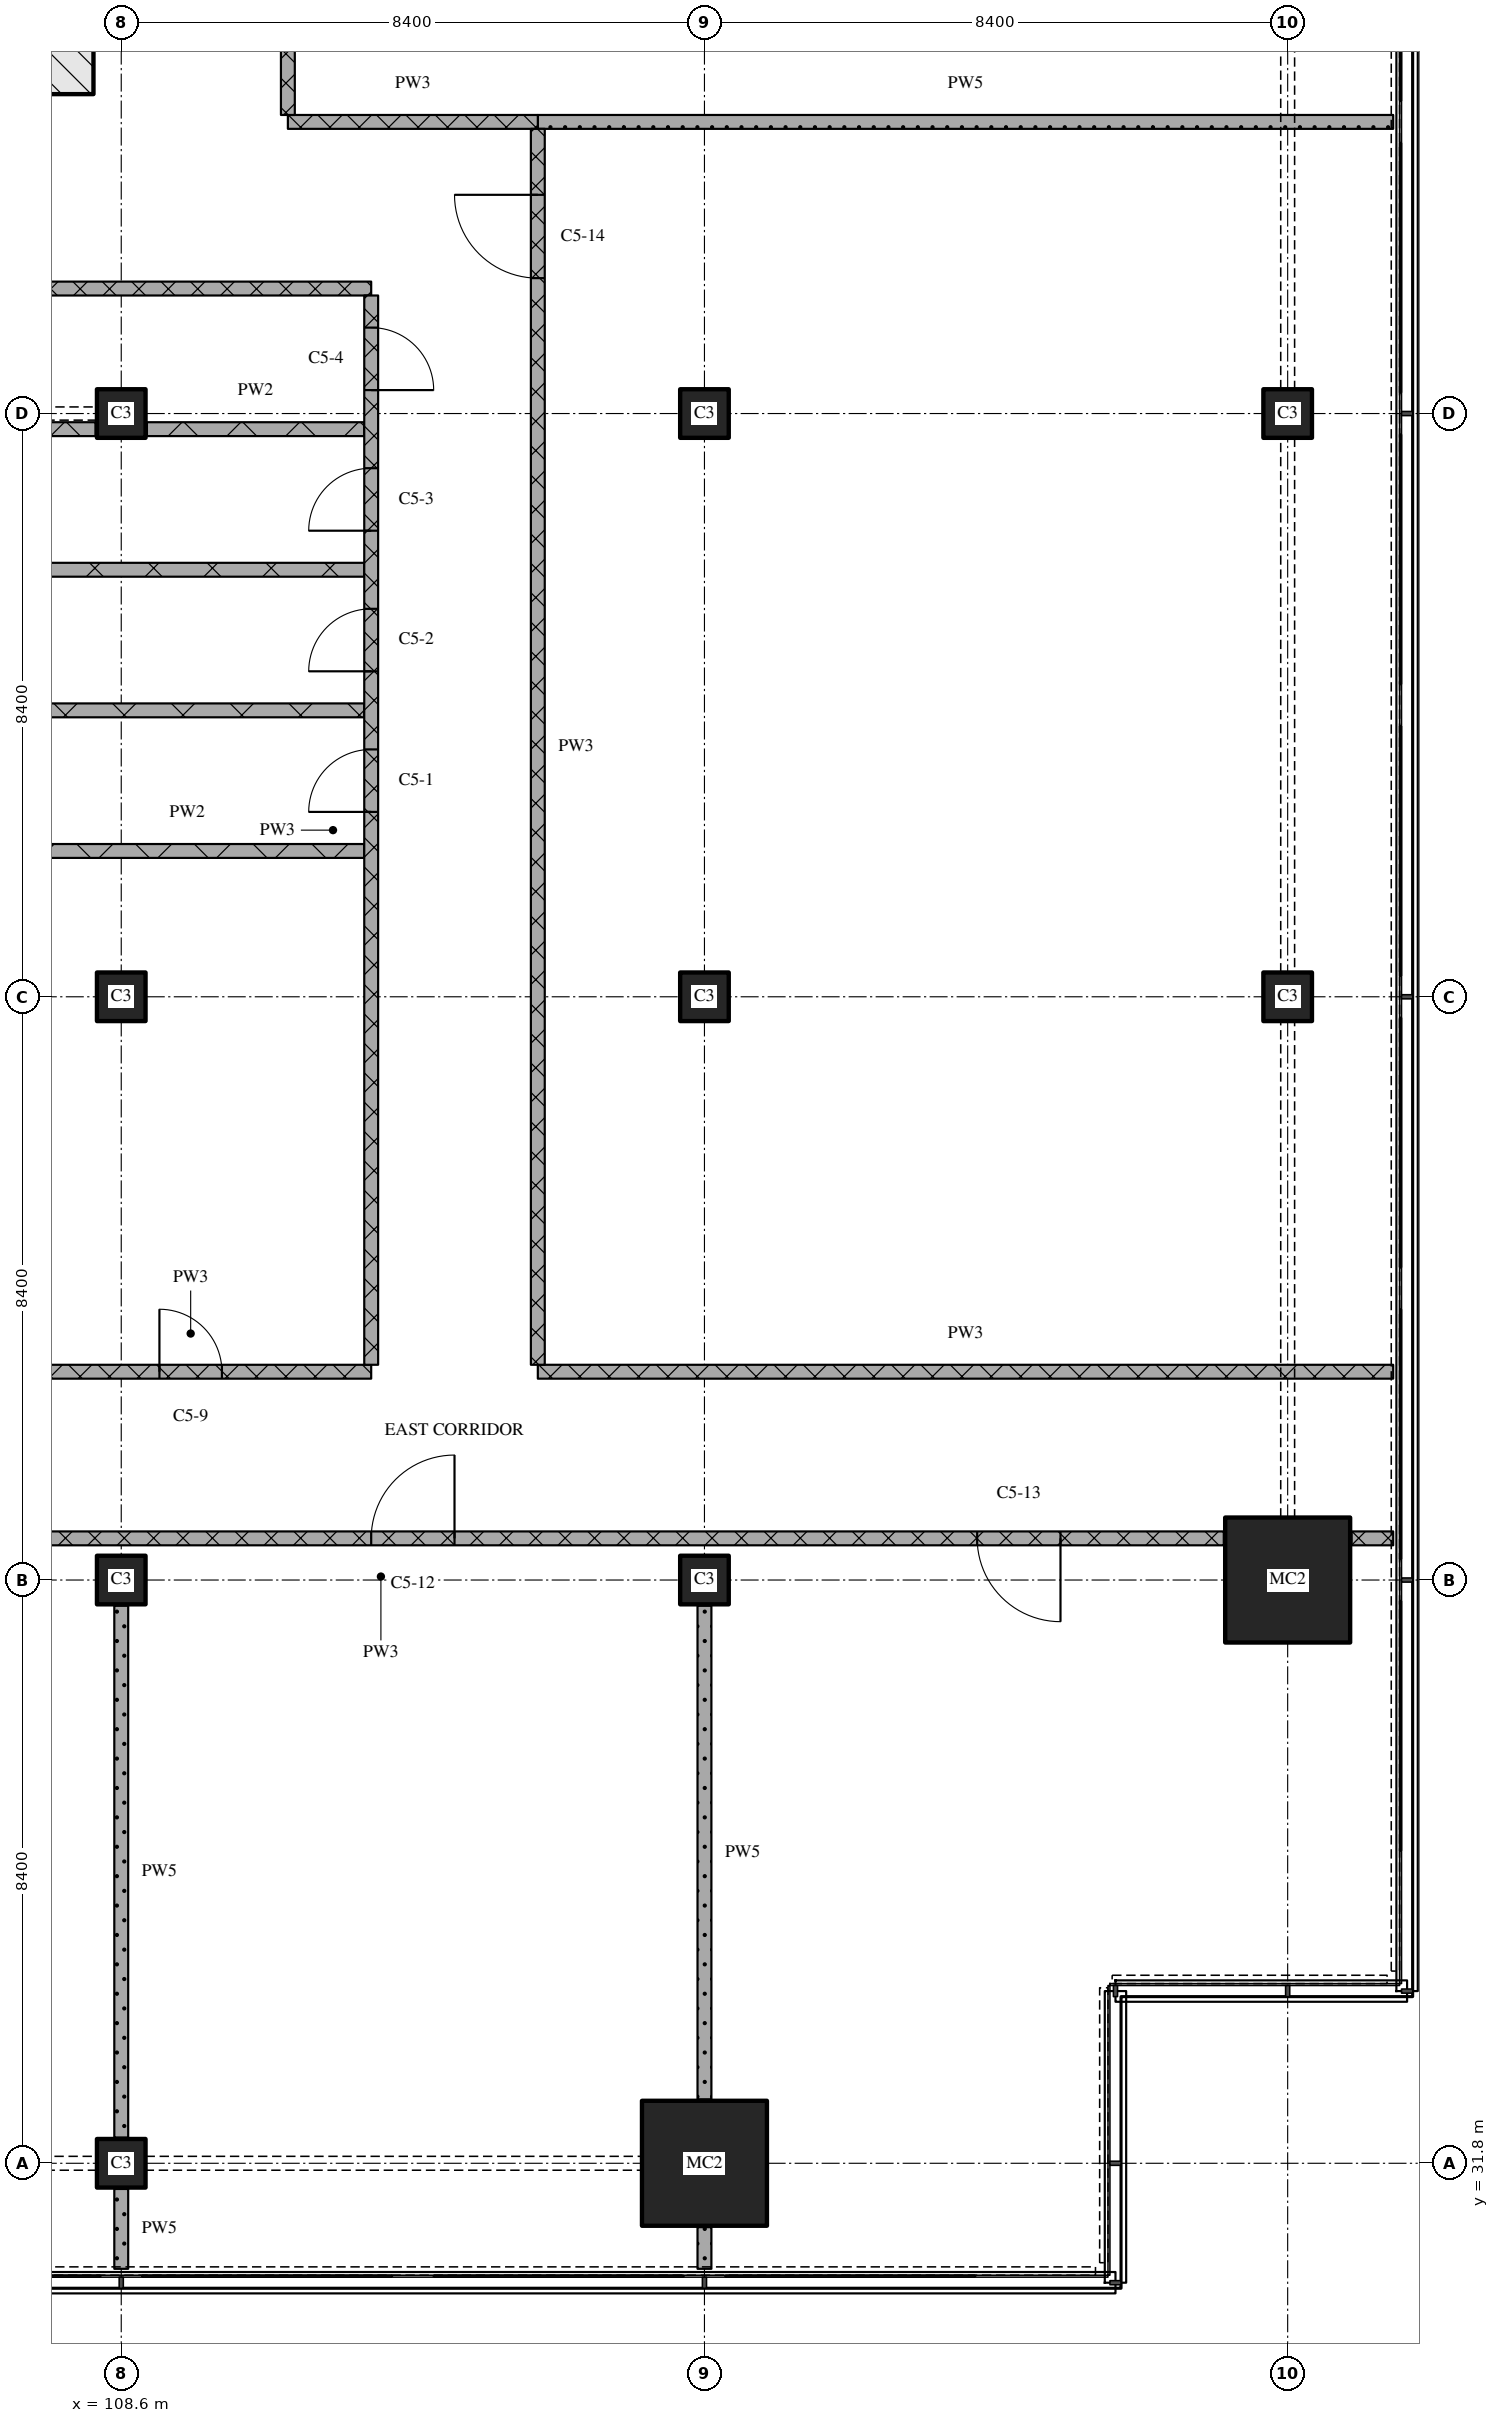
"""IFC4 building model, lengths in metres.
Left out: names, types, materials, properties, quantities, classifications, styles, units other than length and angle.
Written with IfcOpenShell. Run it as: python <this file> out.ifc"""

import sys

from ifc_helpers import new_model, si_unit, direction, frame, frame_2d, origin, origin_2d, place, context, subcontext, project, spatial, rectangle, extrude, element, fill, save


model = new_model("IFC4")
c1 = context("Model", 3, precision=1e-05, world=origin(), true_north=direction((0.0, 1.0)))
c2 = subcontext(c1, "Body", "Model", "MODEL_VIEW")
j1 = project(units=[si_unit("LENGTHUNIT", "METRE"), si_unit("PLANEANGLEUNIT", "RADIAN")], contexts=[c1])
p1 = place(None, origin())
s1 = spatial("IfcSite", under=j1, at=p1, CompositionType="ELEMENT")
p2 = place(p1, origin())
s2 = spatial("IfcBuilding", under=s1, at=p2, CompositionType="ELEMENT")
p3 = place(p2, frame((0.0, 0.0, 190.65)))
s3 = spatial("IfcBuildingStorey", under=s2, at=p3, CompositionType="ELEMENT", Elevation=190.65)
for number, where, z_axis, x_axis in (
    (1, (108.6, 31.8, 0.0), (0.0, 0.0, 1.0), (1.0, 0.0, 0.0)),
    (2, (108.6, 40.2, 0.0), (0.0, 0.0, 1.0), (1.0, 0.0, 0.0)),
    (3, (108.6, 48.6, 0.0), (0.0, 0.0, 1.0), (1.0, 0.0, 0.0)),
    (4, (108.6, 57.0, 0.0), (0.0, 0.0, 1.0), (1.0, 0.0, 0.0)),
):
    element("IfcColumn", number, at=place(p3, frame(where, z_axis=z_axis, x_axis=x_axis)), inside=s3, PredefinedType="COLUMN", context=c2, shape_type="SweptSolid", body=[
        extrude(rectangle(XDim=0.7, YDim=0.7, at=origin_2d()), origin(), (0.0, 0.0, 1.0), 3.6),
    ])
p4 = place(p3, frame((117.0, 31.8, 0.0), z_axis=(0.0, 0.0, 1.0), x_axis=(1.0, 0.0, 0.0)))
e5 = element("IfcColumn", 5, at=p4, inside=s3, PredefinedType="COLUMN", context=c2, shape_type="SweptSolid", body=[
    extrude(rectangle(XDim=1.8, YDim=1.8, at=origin_2d()), origin(), (0.0, 0.0, 1.0), 3.6),
])
for number, where, z_axis, x_axis in (
    (6, (117.0, 40.2, 0.0), (0.0, 0.0, 1.0), (1.0, 0.0, 0.0)),
    (7, (117.0, 48.6, 0.0), (0.0, 0.0, 1.0), (1.0, 0.0, 0.0)),
    (8, (117.0, 57.0, 0.0), (0.0, 0.0, 1.0), (1.0, 0.0, 0.0)),
):
    element("IfcColumn", number, at=place(p3, frame(where, z_axis=z_axis, x_axis=x_axis)), inside=s3, PredefinedType="COLUMN", context=c2, shape_type="SweptSolid", body=[
        extrude(rectangle(XDim=0.7, YDim=0.7, at=origin_2d()), origin(), (0.0, 0.0, 1.0), 3.6),
    ])
p5 = place(p3, frame((125.4, 40.2, 0.0), z_axis=(0.0, 0.0, 1.0), x_axis=(1.0, 0.0, 0.0)))
e9 = element("IfcColumn", 9, at=p5, inside=s3, PredefinedType="COLUMN", context=c2, shape_type="SweptSolid", body=[
    extrude(rectangle(XDim=1.8, YDim=1.8, at=origin_2d()), origin(), (0.0, 0.0, 1.0), 3.6),
])
for number, where, z_axis, x_axis in (
    (10, (125.4, 48.6, 0.0), (0.0, 0.0, 1.0), (1.0, 0.0, 0.0)),
    (11, (125.4, 57.0, 0.0), (0.0, 0.0, 1.0), (1.0, 0.0, 0.0)),
):
    element("IfcColumn", number, at=place(p3, frame(where, z_axis=z_axis, x_axis=x_axis)), inside=s3, PredefinedType="COLUMN", context=c2, shape_type="SweptSolid", body=[
        extrude(rectangle(XDim=0.7, YDim=0.7, at=origin_2d()), origin(), (0.0, 0.0, 1.0), 3.6),
    ])
p6 = place(p3, frame((67.0, 62.0, 0.0), z_axis=(0.0, 0.0, 1.0), x_axis=(1.0, 0.0, 0.0)))
e12 = element("IfcWall", 12, at=p6, inside=s3, PredefinedType="SOLIDWALL", context=c2, shape_type="SweptSolid", body=[
    extrude(rectangle(XDim=41.2, YDim=0.8, at=frame_2d((20.6, 0.0))), origin(), (0.0, 0.0, 1.0), 3.3),
])
p7 = place(p6, frame((20.95, 0.0, 0.0)))
e13 = element("IfcOpeningElement", 13, at=p7, cuts=e12, PredefinedType="OPENING", context=c2, shape_type="SweptSolid", body=[
    extrude(rectangle(XDim=1.8, YDim=2.1, at=frame_2d((0.9, 1.05))), frame((0.0, 0.41, 0.0), z_axis=(0.0, -1.0, 0.0), x_axis=(1.0, 0.0, 0.0)), (0.0, 0.0, 1.0), 0.82),
])
p8 = place(p3, frame((124.48, 40.8, 0.0), z_axis=(0.0, 0.0, 1.0), x_axis=(-1.0, 0.0, 0.0)))
e14 = element("IfcWall", 14, at=p8, inside=s3, PredefinedType="PARTITIONING", context=c2, shape_type="SweptSolid", body=[
    extrude(rectangle(XDim=24.28, YDim=0.2, at=frame_2d((12.14, 0.0))), origin(), (0.0, 0.0, 1.0), 3.3),
])
p9 = place(p8, frame((2.352, 0.0, 0.0)))
e15 = element("IfcOpeningElement", 15, at=p9, cuts=e14, PredefinedType="OPENING", context=c2, shape_type="SweptSolid", body=[
    extrude(rectangle(XDim=1.2, YDim=2.1, at=frame_2d((0.6, 1.05))), frame((0.0, 0.11, 0.0), z_axis=(0.0, -1.0, 0.0), x_axis=(1.0, 0.0, 0.0)), (0.0, 0.0, 1.0), 0.22),
])
p10 = place(p8, frame((11.08, 0.0, 0.0)))
e16 = element("IfcOpeningElement", 16, at=p10, cuts=e14, PredefinedType="OPENING", context=c2, shape_type="SweptSolid", body=[
    extrude(rectangle(XDim=1.2, YDim=2.1, at=frame_2d((0.6, 1.05))), frame((0.0, 0.11, 0.0), z_axis=(0.0, -1.0, 0.0), x_axis=(1.0, 0.0, 0.0)), (0.0, 0.0, 1.0), 0.22),
])
p11 = place(p8, frame((19.48, 0.0, 0.0)))
e17 = element("IfcOpeningElement", 17, at=p11, cuts=e14, PredefinedType="OPENING", context=c2, shape_type="SweptSolid", body=[
    extrude(rectangle(XDim=1.2, YDim=2.1, at=frame_2d((0.6, 1.05))), frame((0.0, 0.11, 0.0), z_axis=(0.0, -1.0, 0.0), x_axis=(1.0, 0.0, 0.0)), (0.0, 0.0, 1.0), 0.22),
])
p12 = place(p3, frame((126.32, 40.8, 0.0), z_axis=(0.0, 0.0, 1.0), x_axis=(1.0, 0.0, 0.0)))
e18 = element("IfcWall", 18, at=p12, inside=s3, PredefinedType="PARTITIONING", context=c2, shape_type="SweptSolid", body=[
    extrude(rectangle(XDim=0.6, YDim=0.2, at=frame_2d((0.3, 0.0))), origin(), (0.0, 0.0, 1.0), 3.3),
])
p13 = place(p3, frame((107.0, 43.2, 0.0), z_axis=(0.0, 0.0, 1.0), x_axis=(1.0, 0.0, 0.0)))
e19 = element("IfcWall", 19, at=p13, inside=s3, PredefinedType="PARTITIONING", context=c2, shape_type="SweptSolid", body=[
    extrude(rectangle(XDim=5.2, YDim=0.2, at=frame_2d((2.6, 0.0))), origin(), (0.0, 0.0, 1.0), 3.3),
])
p14 = place(p13, frame((2.15, 0.0, 0.0)))
e20 = element("IfcOpeningElement", 20, at=p14, cuts=e19, PredefinedType="OPENING", context=c2, shape_type="SweptSolid", body=[
    extrude(rectangle(XDim=0.9, YDim=2.1, at=frame_2d((0.45, 1.05))), frame((0.0, 0.11, 0.0), z_axis=(0.0, -1.0, 0.0), x_axis=(1.0, 0.0, 0.0)), (0.0, 0.0, 1.0), 0.22),
])
p15 = place(p3, frame((114.6, 43.2, 0.0), z_axis=(0.0, 0.0, 1.0), x_axis=(1.0, 0.0, 0.0)))
e21 = element("IfcWall", 21, at=p15, inside=s3, PredefinedType="PARTITIONING", context=c2, shape_type="SweptSolid", body=[
    extrude(rectangle(XDim=12.32, YDim=0.2, at=frame_2d((6.16, 0.0))), origin(), (0.0, 0.0, 1.0), 3.3),
])
p16 = place(p3, frame((107.0, 50.7, 0.0), z_axis=(0.0, 0.0, 1.0), x_axis=(1.0, 0.0, 0.0)))
e22 = element("IfcWall", 22, at=p16, inside=s3, PredefinedType="PARTITIONING", context=c2, shape_type="SweptSolid", body=[
    extrude(rectangle(XDim=5.1, YDim=0.2, at=frame_2d((2.55, 0.0))), origin(), (0.0, 0.0, 1.0), 3.3),
])
for number, where, z_axis, x_axis in (
    (23, (101.5, 52.725, 0.0), (0.0, 0.0, 1.0), (1.0, 0.0, 0.0)),
    (24, (101.5, 54.75, 0.0), (0.0, 0.0, 1.0), (1.0, 0.0, 0.0)),
):
    element("IfcWall", number, at=place(p3, frame(where, z_axis=z_axis, x_axis=x_axis)), inside=s3, PredefinedType="PARTITIONING", context=c2, shape_type="SweptSolid", body=[
        extrude(rectangle(XDim=10.6, YDim=0.2, at=frame_2d((5.3, 0.0))), origin(), (0.0, 0.0, 1.0), 3.3),
    ])
p17 = place(p3, frame((101.5, 56.775, 0.0), z_axis=(0.0, 0.0, 1.0), x_axis=(1.0, 0.0, 0.0)))
e25 = element("IfcWall", 25, at=p17, inside=s3, PredefinedType="PARTITIONING", context=c2, shape_type="SweptSolid", body=[
    extrude(rectangle(XDim=6.73, YDim=0.2, at=frame_2d((3.365, 0.0))), origin(), (0.0, 0.0, 1.0), 3.3),
])
p18 = place(p3, frame((108.97, 56.775, 0.0), z_axis=(0.0, 0.0, 1.0), x_axis=(1.0, 0.0, 0.0)))
e26 = element("IfcWall", 26, at=p18, inside=s3, PredefinedType="PARTITIONING", context=c2, shape_type="SweptSolid", body=[
    extrude(rectangle(XDim=3.13, YDim=0.2, at=frame_2d((1.565, 0.0))), origin(), (0.0, 0.0, 1.0), 3.3),
])
p19 = place(p3, frame((101.4, 58.8, 0.0), z_axis=(0.0, 0.0, 1.0), x_axis=(1.0, 0.0, 0.0)))
e27 = element("IfcWall", 27, at=p19, inside=s3, PredefinedType="PARTITIONING", context=c2, shape_type="SweptSolid", body=[
    extrude(rectangle(XDim=10.8, YDim=0.2, at=frame_2d((5.4, 0.0))), origin(), (0.0, 0.0, 1.0), 3.3),
])
p20 = place(p3, frame((111.0, 61.2, 0.0), z_axis=(0.0, 0.0, 1.0), x_axis=(1.0, 0.0, 0.0)))
e28 = element("IfcWall", 28, at=p20, inside=s3, PredefinedType="PARTITIONING", context=c2, shape_type="SweptSolid", body=[
    extrude(rectangle(XDim=3.6, YDim=0.2, at=frame_2d((1.8, 0.0))), origin(), (0.0, 0.0, 1.0), 3.3),
])
p21 = place(p3, frame((114.6, 61.2, 0.0), z_axis=(0.0, 0.0, 1.0), x_axis=(1.0, 0.0, 0.0)))
e29 = element("IfcWall", 29, at=p21, inside=s3, PredefinedType="PARTITIONING", context=c2, shape_type="SweptSolid", body=[
    extrude(rectangle(XDim=12.32, YDim=0.2, at=frame_2d((6.16, 0.0))), origin(), (0.0, 0.0, 1.0), 3.3),
])
p22 = place(p3, frame((108.6, 31.43, 0.0), z_axis=(0.0, 0.0, 1.0), x_axis=(0.0, -1.0, 0.0)))
e30 = element("IfcWall", 30, at=p22, inside=s3, PredefinedType="PARTITIONING", context=c2, shape_type="SweptSolid", body=[
    extrude(rectangle(XDim=1.15, YDim=0.2, at=frame_2d((0.575, 0.0))), origin(), (0.0, 0.0, 1.0), 3.3),
])
p23 = place(p3, frame((108.6, 39.83, 0.0), z_axis=(0.0, 0.0, 1.0), x_axis=(0.0, -1.0, 0.0)))
e31 = element("IfcWall", 31, at=p23, inside=s3, PredefinedType="PARTITIONING", context=c2, shape_type="SweptSolid", body=[
    extrude(rectangle(XDim=7.66, YDim=0.2, at=frame_2d((3.83, 0.0))), origin(), (0.0, 0.0, 1.0), 3.3),
])
p24 = place(p3, frame((111.0, 75.32, 0.0), z_axis=(0.0, 0.0, 1.0), x_axis=(0.0, -1.0, 0.0)))
e32 = element("IfcWall", 32, at=p24, inside=s3, PredefinedType="PARTITIONING", context=c2, shape_type="SweptSolid", body=[
    extrude(rectangle(XDim=14.02, YDim=0.2, at=frame_2d((7.01, 0.0))), origin(), (0.0, 0.0, 1.0), 3.3),
])
p25 = place(p24, frame((6.737, 0.0, 0.0)))
e33 = element("IfcOpeningElement", 33, at=p25, cuts=e32, PredefinedType="OPENING", context=c2, shape_type="SweptSolid", body=[
    extrude(rectangle(XDim=1.2, YDim=2.1, at=frame_2d((0.6, 1.05))), frame((0.0, 0.11, 0.0), z_axis=(0.0, -1.0, 0.0), x_axis=(1.0, 0.0, 0.0)), (0.0, 0.0, 1.0), 0.22),
])
p26 = place(p3, frame((112.2, 43.3, 0.0), z_axis=(0.0, 0.0, 1.0), x_axis=(0.0, 1.0, 0.0)))
e34 = element("IfcWall", 34, at=p26, inside=s3, PredefinedType="PARTITIONING", context=c2, shape_type="SweptSolid", body=[
    extrude(rectangle(XDim=15.4, YDim=0.2, at=frame_2d((7.7, 0.0))), origin(), (0.0, 0.0, 1.0), 3.3),
])
p27 = place(p26, frame((7.962, 0.0, 0.0)))
e35 = element("IfcOpeningElement", 35, at=p27, cuts=e34, PredefinedType="OPENING", context=c2, shape_type="SweptSolid", body=[
    extrude(rectangle(XDim=0.9, YDim=2.1, at=frame_2d((0.45, 1.05))), frame((0.0, 0.11, 0.0), z_axis=(0.0, -1.0, 0.0), x_axis=(1.0, 0.0, 0.0)), (0.0, 0.0, 1.0), 0.22),
])
p28 = place(p26, frame((9.988, 0.0, 0.0)))
e36 = element("IfcOpeningElement", 36, at=p28, cuts=e34, PredefinedType="OPENING", context=c2, shape_type="SweptSolid", body=[
    extrude(rectangle(XDim=0.9, YDim=2.1, at=frame_2d((0.45, 1.05))), frame((0.0, 0.11, 0.0), z_axis=(0.0, -1.0, 0.0), x_axis=(1.0, 0.0, 0.0)), (0.0, 0.0, 1.0), 0.22),
])
p29 = place(p26, frame((12.012, 0.0, 0.0)))
e37 = element("IfcOpeningElement", 37, at=p29, cuts=e34, PredefinedType="OPENING", context=c2, shape_type="SweptSolid", body=[
    extrude(rectangle(XDim=0.9, YDim=2.1, at=frame_2d((0.45, 1.05))), frame((0.0, 0.11, 0.0), z_axis=(0.0, -1.0, 0.0), x_axis=(1.0, 0.0, 0.0)), (0.0, 0.0, 1.0), 0.22),
])
p30 = place(p26, frame((14.038, 0.0, 0.0)))
e38 = element("IfcOpeningElement", 38, at=p30, cuts=e34, PredefinedType="OPENING", context=c2, shape_type="SweptSolid", body=[
    extrude(rectangle(XDim=0.9, YDim=2.1, at=frame_2d((0.45, 1.05))), frame((0.0, 0.11, 0.0), z_axis=(0.0, -1.0, 0.0), x_axis=(1.0, 0.0, 0.0)), (0.0, 0.0, 1.0), 0.22),
])
p31 = place(p3, frame((114.6, 61.1, 0.0), z_axis=(0.0, 0.0, 1.0), x_axis=(0.0, -1.0, 0.0)))
e39 = element("IfcWall", 39, at=p31, inside=s3, PredefinedType="PARTITIONING", context=c2, shape_type="SweptSolid", body=[
    extrude(rectangle(XDim=17.8, YDim=0.2, at=frame_2d((8.9, 0.0))), origin(), (0.0, 0.0, 1.0), 3.3),
])
p32 = place(p31, frame((0.95, 0.0, 0.0)))
e40 = element("IfcOpeningElement", 40, at=p32, cuts=e39, PredefinedType="OPENING", context=c2, shape_type="SweptSolid", body=[
    extrude(rectangle(XDim=1.2, YDim=2.1, at=frame_2d((0.6, 1.05))), frame((0.0, 0.11, 0.0), z_axis=(0.0, -1.0, 0.0), x_axis=(1.0, 0.0, 0.0)), (0.0, 0.0, 1.0), 0.22),
])
p33 = place(p3, frame((117.0, 30.88, 0.0), z_axis=(0.0, 0.0, 1.0), x_axis=(0.0, -1.0, 0.0)))
e41 = element("IfcWall", 41, at=p33, inside=s3, PredefinedType="PARTITIONING", context=c2, shape_type="SweptSolid", body=[
    extrude(rectangle(XDim=0.6, YDim=0.2, at=frame_2d((0.3, 0.0))), origin(), (0.0, 0.0, 1.0), 3.3),
])
p34 = place(p3, frame((117.0, 39.83, 0.0), z_axis=(0.0, 0.0, 1.0), x_axis=(0.0, -1.0, 0.0)))
e42 = element("IfcWall", 42, at=p34, inside=s3, PredefinedType="PARTITIONING", context=c2, shape_type="SweptSolid", body=[
    extrude(rectangle(XDim=7.11, YDim=0.2, at=frame_2d((3.555, 0.0))), origin(), (0.0, 0.0, 1.0), 3.3),
])
p35 = place(p9, origin())
e43 = element("IfcDoor", 43, at=p35, inside=s3, OperationType="SINGLE_SWING_LEFT", PredefinedType="DOOR", context=c2, shape_type="SweptSolid", body=[
    extrude(rectangle(XDim=1.2, YDim=2.1, at=frame_2d((0.6, 1.05))), frame((0.0, 0.025, 0.0), z_axis=(0.0, -1.0, 0.0), x_axis=(1.0, 0.0, 0.0)), (0.0, 0.0, 1.0), 0.05),
])
fill(e15, e43)
p36 = place(p10, origin())
e44 = element("IfcDoor", 44, at=p36, inside=s3, OperationType="SINGLE_SWING_RIGHT", PredefinedType="DOOR", context=c2, shape_type="SweptSolid", body=[
    extrude(rectangle(XDim=1.2, YDim=2.1, at=frame_2d((0.6, 1.05))), frame((0.0, 0.025, 0.0), z_axis=(0.0, -1.0, 0.0), x_axis=(1.0, 0.0, 0.0)), (0.0, 0.0, 1.0), 0.05),
])
fill(e16, e44)
p37 = place(p14, origin())
e45 = element("IfcDoor", 45, at=p37, inside=s3, OperationType="SINGLE_SWING_LEFT", PredefinedType="DOOR", context=c2, shape_type="SweptSolid", body=[
    extrude(rectangle(XDim=0.9, YDim=2.1, at=frame_2d((0.45, 1.05))), frame((0.0, 0.025, 0.0), z_axis=(0.0, -1.0, 0.0), x_axis=(1.0, 0.0, 0.0)), (0.0, 0.0, 1.0), 0.05),
])
fill(e20, e45)
p38 = place(p27, origin())
e46 = element("IfcDoor", 46, at=p38, inside=s3, OperationType="SINGLE_SWING_LEFT", PredefinedType="DOOR", context=c2, shape_type="SweptSolid", body=[
    extrude(rectangle(XDim=0.9, YDim=2.1, at=frame_2d((0.45, 1.05))), frame((0.0, 0.025, 0.0), z_axis=(0.0, -1.0, 0.0), x_axis=(1.0, 0.0, 0.0)), (0.0, 0.0, 1.0), 0.05),
])
fill(e35, e46)
p39 = place(p28, origin())
e47 = element("IfcDoor", 47, at=p39, inside=s3, OperationType="SINGLE_SWING_LEFT", PredefinedType="DOOR", context=c2, shape_type="SweptSolid", body=[
    extrude(rectangle(XDim=0.9, YDim=2.1, at=frame_2d((0.45, 1.05))), frame((0.0, 0.025, 0.0), z_axis=(0.0, -1.0, 0.0), x_axis=(1.0, 0.0, 0.0)), (0.0, 0.0, 1.0), 0.05),
])
fill(e36, e47)
p40 = place(p29, origin())
e48 = element("IfcDoor", 48, at=p40, inside=s3, OperationType="SINGLE_SWING_LEFT", PredefinedType="DOOR", context=c2, shape_type="SweptSolid", body=[
    extrude(rectangle(XDim=0.9, YDim=2.1, at=frame_2d((0.45, 1.05))), frame((0.0, 0.025, 0.0), z_axis=(0.0, -1.0, 0.0), x_axis=(1.0, 0.0, 0.0)), (0.0, 0.0, 1.0), 0.05),
])
fill(e37, e48)
p41 = place(p30, origin())
e49 = element("IfcDoor", 49, at=p41, inside=s3, OperationType="SINGLE_SWING_RIGHT", PredefinedType="DOOR", context=c2, shape_type="SweptSolid", body=[
    extrude(rectangle(XDim=0.9, YDim=2.1, at=frame_2d((0.45, 1.05))), frame((0.0, 0.025, 0.0), z_axis=(0.0, -1.0, 0.0), x_axis=(1.0, 0.0, 0.0)), (0.0, 0.0, 1.0), 0.05),
])
fill(e38, e49)
p42 = place(p32, origin())
e50 = element("IfcDoor", 50, at=p42, inside=s3, OperationType="SINGLE_SWING_RIGHT", PredefinedType="DOOR", context=c2, shape_type="SweptSolid", body=[
    extrude(rectangle(XDim=1.2, YDim=2.1, at=frame_2d((0.6, 1.05))), frame((0.0, 0.025, 0.0), z_axis=(0.0, -1.0, 0.0), x_axis=(1.0, 0.0, 0.0)), (0.0, 0.0, 1.0), 0.05),
])
fill(e40, e50)
save(model, sys.argv[1])
